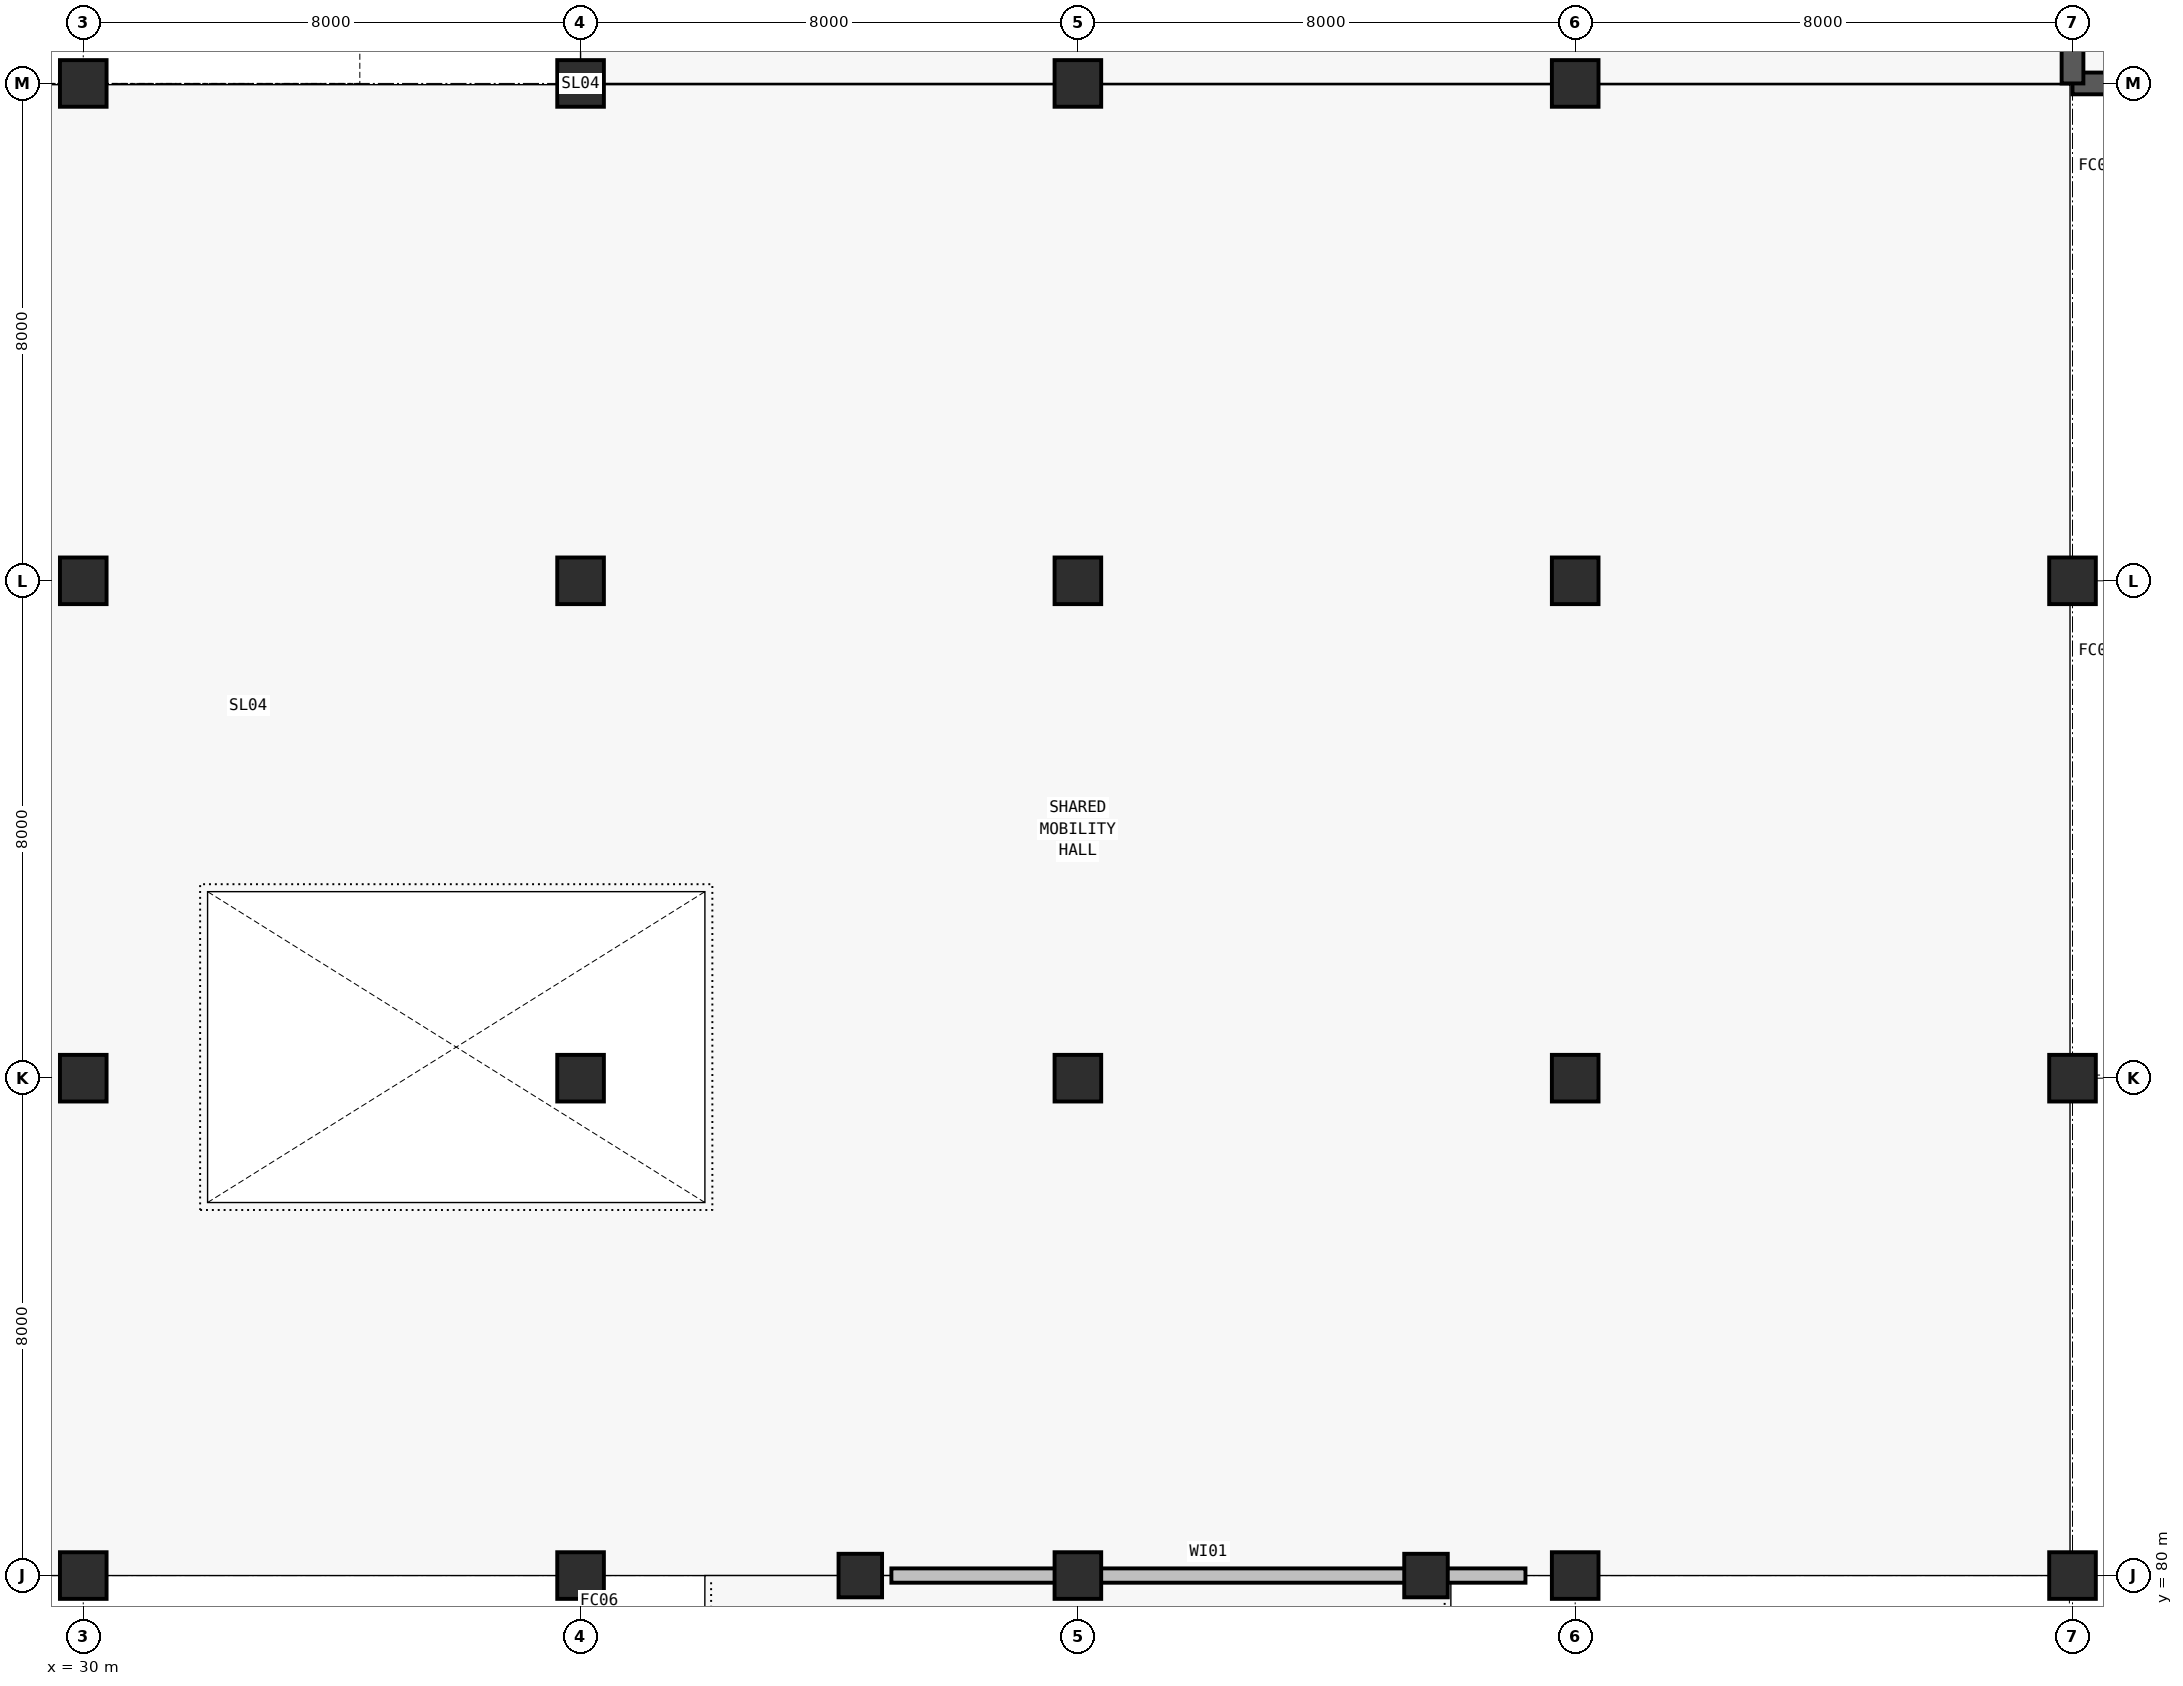
"""IFC4 building model, lengths in metres.
Left out: names, types, materials, properties, quantities, classifications, styles, units other than length and angle.
Written with IfcOpenShell. Run it as: python <this file> out.ifc"""

import sys

from ifc_helpers import new_model, si_unit, direction, frame, frame_2d, origin, origin_2d, place, context, subcontext, project, spatial, rectangle, extrude, element, save


model = new_model("IFC4")
c1 = context("Model", 3, precision=1e-05, world=origin(), true_north=direction((0.0, 1.0)))
c2 = subcontext(c1, "Body", "Model", "MODEL_VIEW")
j1 = project(units=[si_unit("LENGTHUNIT", "METRE"), si_unit("PLANEANGLEUNIT", "RADIAN")], contexts=[c1])
p1 = place(None, origin())
s1 = spatial("IfcSite", under=j1, at=p1, CompositionType="ELEMENT")
p2 = place(p1, origin())
s2 = spatial("IfcBuilding", under=s1, at=p2, CompositionType="ELEMENT")
p3 = place(p2, frame((0.0, 0.0, 13.4)))
s3 = spatial("IfcBuildingStorey", under=s2, at=p3, CompositionType="ELEMENT", Elevation=13.4)
for number, where, z_axis, x_axis in (
    (1, (30.0, 104.0, 0.0), (0.0, 0.0, 1.0), (1.0, 0.0, 0.0)),
    (2, (38.0, 104.0, 0.0), (0.0, 0.0, 1.0), (1.0, 0.0, 0.0)),
    (3, (46.0, 104.0, 0.0), (0.0, 0.0, 1.0), (1.0, 0.0, 0.0)),
    (4, (54.0, 104.0, 0.0), (0.0, 0.0, 1.0), (1.0, 0.0, 0.0)),
    (5, (30.0, 80.0, 0.0), (0.0, 0.0, 1.0), (1.0, 0.0, 0.0)),
    (6, (30.0, 88.0, 0.0), (0.0, 0.0, 1.0), (1.0, 0.0, 0.0)),
    (7, (30.0, 96.0, 0.0), (0.0, 0.0, 1.0), (1.0, 0.0, 0.0)),
    (8, (38.0, 80.0, 0.0), (0.0, 0.0, 1.0), (1.0, 0.0, 0.0)),
    (9, (38.0, 88.0, 0.0), (0.0, 0.0, 1.0), (1.0, 0.0, 0.0)),
    (10, (38.0, 96.0, 0.0), (0.0, 0.0, 1.0), (1.0, 0.0, 0.0)),
    (11, (46.0, 80.0, 0.0), (0.0, 0.0, 1.0), (1.0, 0.0, 0.0)),
    (12, (46.0, 88.0, 0.0), (0.0, 0.0, 1.0), (1.0, 0.0, 0.0)),
    (13, (46.0, 96.0, 0.0), (0.0, 0.0, 1.0), (1.0, 0.0, 0.0)),
    (14, (54.0, 80.0, 0.0), (0.0, 0.0, 1.0), (1.0, 0.0, 0.0)),
    (15, (54.0, 88.0, 0.0), (0.0, 0.0, 1.0), (1.0, 0.0, 0.0)),
    (16, (54.0, 96.0, 0.0), (0.0, 0.0, 1.0), (1.0, 0.0, 0.0)),
    (17, (62.0, 80.0, 0.0), (0.0, 0.0, 1.0), (1.0, 0.0, 0.0)),
    (18, (62.0, 88.0, 0.0), (0.0, 0.0, 1.0), (1.0, 0.0, 0.0)),
    (19, (62.0, 96.0, 0.0), (0.0, 0.0, 1.0), (1.0, 0.0, 0.0)),
):
    element("IfcColumn", number, at=place(p3, frame(where, z_axis=z_axis, x_axis=x_axis)), inside=s3, PredefinedType="COLUMN", context=c2, shape_type="SweptSolid", body=[
        extrude(rectangle(XDim=0.75, YDim=0.75, at=origin_2d()), origin(), (0.0, 0.0, 1.0), 3.9),
    ])
for number, where, z_axis, x_axis in (
    (20, (51.6, 80.0, 0.0), (0.0, 0.0, 1.0), (1.0, 0.0, 0.0)),
    (21, (42.5, 80.0, 0.0), (0.0, 0.0, 1.0), (1.0, 0.0, 0.0)),
):
    element("IfcColumn", number, at=place(p3, frame(where, z_axis=z_axis, x_axis=x_axis)), inside=s3, PredefinedType="COLUMN", context=c2, shape_type="SweptSolid", body=[
        extrude(rectangle(XDim=0.7, YDim=0.7, at=origin_2d()), origin(), (0.0, 0.0, 1.0), 3.9),
    ])
p4 = place(p3, frame((62.0, 104.0, 0.0), z_axis=(0.0, 0.0, 1.0), x_axis=(1.0, 0.0, 0.0)))
e22 = element("IfcWall", 22, at=p4, inside=s3, PredefinedType="SHEAR", context=c2, shape_type="SweptSolid", body=[
    extrude(rectangle(XDim=8.0, YDim=0.35, at=frame_2d((4.0, 0.0))), origin(), (0.0, 0.0, 1.0), 3.62),
])
p5 = place(p3, frame((62.0, 113.0, 0.0), z_axis=(0.0, 0.0, 1.0), x_axis=(0.0, -1.0, 0.0)))
e23 = element("IfcWall", 23, at=p5, inside=s3, PredefinedType="SHEAR", context=c2, shape_type="SweptSolid", body=[
    extrude(rectangle(XDim=9.0, YDim=0.35, at=frame_2d((4.5, 0.0))), origin(), (0.0, 0.0, 1.0), 3.62),
])
p6 = place(p3, frame((43.0, 80.0, 0.0), z_axis=(0.0, 0.0, 1.0), x_axis=(1.0, 0.0, 0.0)))
e24 = element("IfcWall", 24, at=p6, inside=s3, PredefinedType="PARTITIONING", context=c2, shape_type="SweptSolid", body=[
    extrude(rectangle(XDim=10.2, YDim=0.23, at=frame_2d((5.1, 0.0))), origin(), (0.0, 0.0, 1.0), 2.48),
])
save(model, sys.argv[1])
